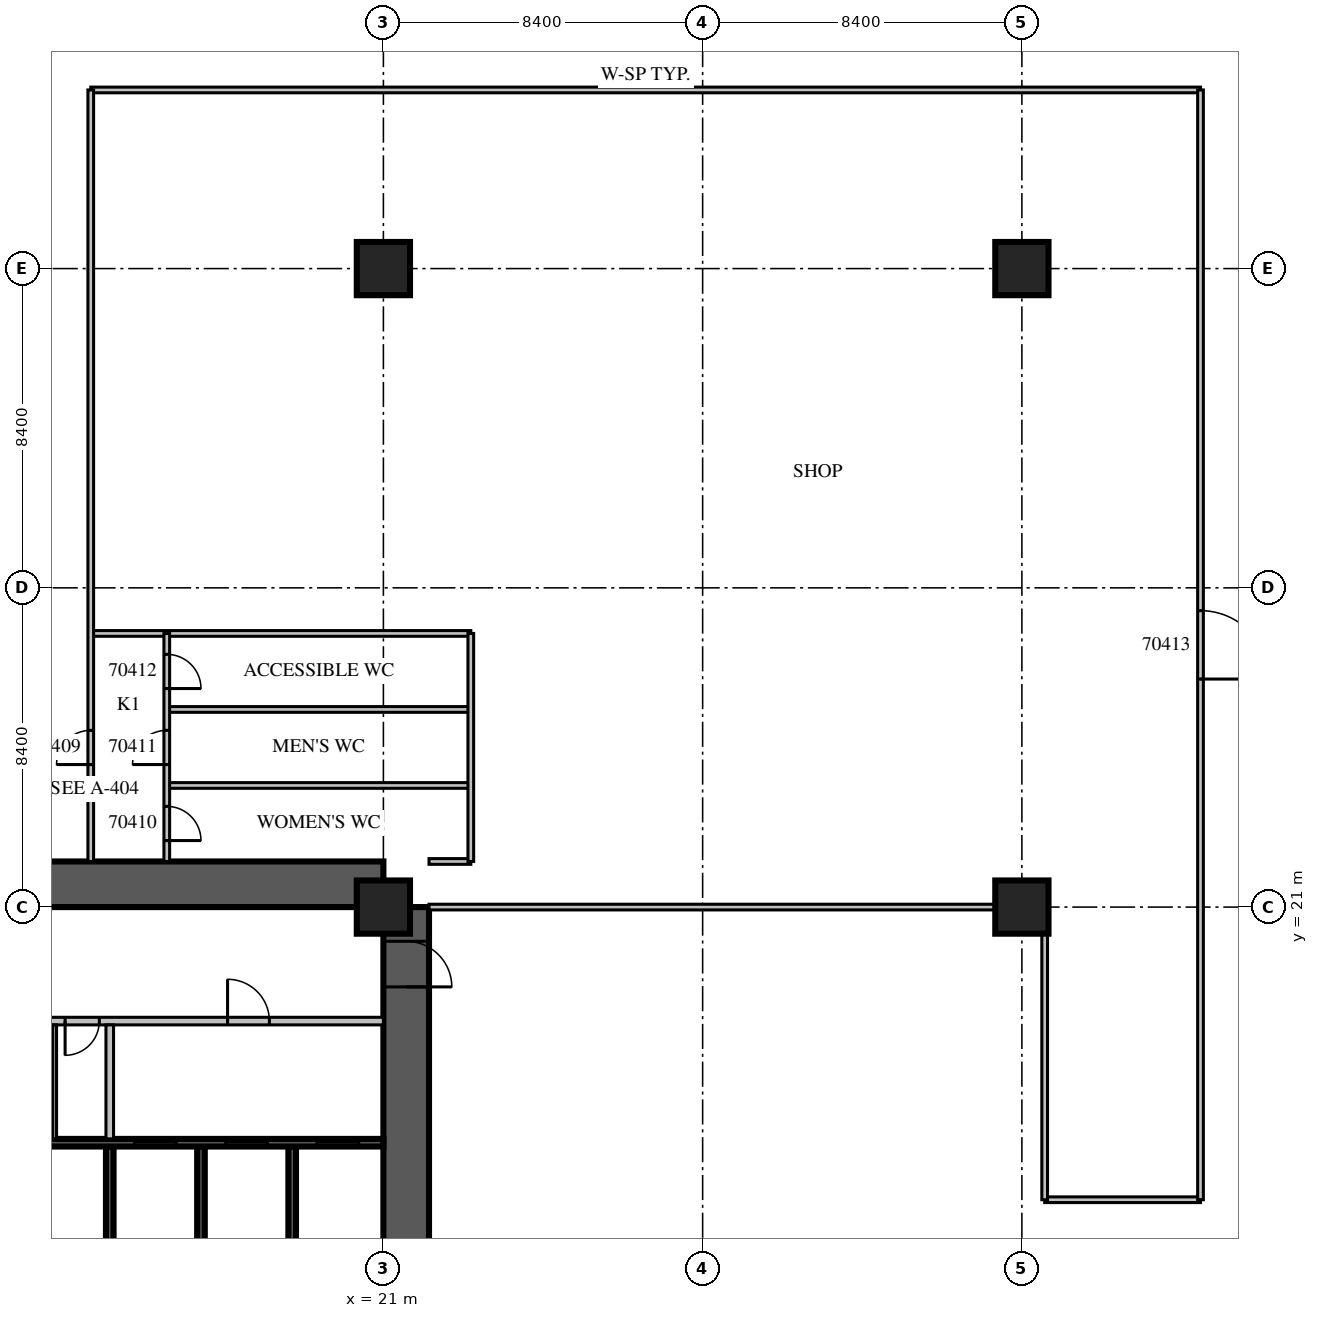
"""IFC4 building model, lengths in metres.
Left out: names, types, materials, properties, quantities, classifications, styles, units other than length and angle.
Written with IfcOpenShell. Run it as: python <this file> out.ifc"""

import sys

from ifc_helpers import new_model, si_unit, direction, frame, frame_2d, origin, origin_2d, place, context, subcontext, project, spatial, rectangle, extrude, source, transform, mapped, element, fill, save


model = new_model("IFC4")
c1 = context("Model", 3, precision=1e-05, world=origin(), true_north=direction((0.0, 1.0)))
c2 = subcontext(c1, "Body", "Model", "MODEL_VIEW")
j1 = project(units=[si_unit("LENGTHUNIT", "METRE"), si_unit("PLANEANGLEUNIT", "RADIAN")], contexts=[c1])
p1 = place(None, origin())
s1 = spatial("IfcSite", under=j1, at=p1, CompositionType="ELEMENT")
p2 = place(p1, origin())
s2 = spatial("IfcBuilding", under=s1, at=p2, CompositionType="ELEMENT")
p3 = place(p2, frame((0.0, 0.0, 7.5)))
s3 = spatial("IfcBuildingStorey", under=s2, at=p3, CompositionType="ELEMENT", Elevation=7.5)
m1 = source(origin(), c2, "Body", "SweptSolid", [
    extrude(rectangle(XDim=1.4, YDim=1.4, at=origin_2d()), origin(), (0.0, 0.0, 1.0), 5.4),
])
for number, where, z_axis, x_axis in (
    (1, (21.0, 21.0, 0.0), (0.0, 0.0, 1.0), (1.0, 0.0, 0.0)),
    (2, (21.0, 37.8, 0.0), (0.0, 0.0, 1.0), (1.0, 0.0, 0.0)),
    (3, (37.8, 21.0, 0.0), (0.0, 0.0, 1.0), (1.0, 0.0, 0.0)),
    (4, (37.8, 37.8, 0.0), (0.0, 0.0, 1.0), (1.0, 0.0, 0.0)),
):
    element("IfcColumn", number, at=place(p3, frame(where, z_axis=z_axis, x_axis=x_axis)), inside=s3, PredefinedType="COLUMN", context=c2, shape_type="MappedRepresentation", body=[
        mapped(m1, transform((0.0, 0.0, 0.0), scale=1.0)),
    ])
p4 = place(p3, frame((21.6, 4.2, 0.0), z_axis=(0.0, 0.0, 1.0), x_axis=(0.0, 1.0, 0.0)))
e5 = element("IfcWall", 5, at=p4, inside=s3, PredefinedType="SHEAR", context=c2, shape_type="SweptSolid", body=[
    extrude(rectangle(XDim=16.8, YDim=1.2, at=frame_2d((8.4, 0.0))), origin(), (0.0, 0.0, 1.0), 5.4),
])
m2 = source(origin(), c2, "Body", "SweptSolid", [
    extrude(rectangle(XDim=2.2, YDim=2.1, at=frame_2d((1.1, 1.05))), frame((0.0, 0.61, 0.0), z_axis=(0.0, -1.0, 0.0), x_axis=(1.0, 0.0, 0.0)), (0.0, 0.0, 1.0), 1.22),
])
p5 = place(p4, frame((4.2, 0.0, 0.0)))
e6 = element("IfcOpeningElement", 6, at=p5, cuts=e5, PredefinedType="OPENING", context=c2, shape_type="MappedRepresentation", body=[
    mapped(m2, transform((0.0, 0.0, 0.0), scale=1.0)),
])
m3 = source(origin(), c2, "Body", "SweptSolid", [
    extrude(rectangle(XDim=1.2, YDim=2.1, at=frame_2d((0.6, 1.05))), frame((0.0, 0.61, 0.0), z_axis=(0.0, -1.0, 0.0), x_axis=(1.0, 0.0, 0.0)), (0.0, 0.0, 1.0), 1.22),
])
p6 = place(p4, frame((14.7, 0.0, 0.0)))
e7 = element("IfcOpeningElement", 7, at=p6, cuts=e5, PredefinedType="OPENING", context=c2, shape_type="MappedRepresentation", body=[
    mapped(m3, transform((0.0, 0.0, 0.0), scale=1.0)),
])
m4 = source(origin(), c2, "Body", "SweptSolid", [
    extrude(rectangle(XDim=16.8, YDim=1.2, at=frame_2d((8.4, 0.0))), origin(), (0.0, 0.0, 1.0), 5.4),
])
p7 = place(p3, frame((4.2, 21.6, 0.0), z_axis=(0.0, 0.0, 1.0), x_axis=(1.0, 0.0, 0.0)))
e8 = element("IfcWall", 8, at=p7, inside=s3, PredefinedType="SHEAR", context=c2, shape_type="MappedRepresentation", body=[
    mapped(m4, transform((0.0, 0.0, 0.0), scale=1.0)),
])
p8 = place(p7, frame((6.2, 0.0, 0.0)))
e9 = element("IfcOpeningElement", 9, at=p8, cuts=e8, PredefinedType="OPENING", context=c2, shape_type="MappedRepresentation", body=[
    mapped(m3, transform((0.0, 0.0, 0.0), scale=1.0)),
])
m5 = source(origin(), c2, "Body", "SweptSolid", [
    extrude(rectangle(XDim=3.0, YDim=0.2, at=frame_2d((1.5, 0.0))), origin(), (0.0, 0.0, 1.0), 5.4),
])
for number, where, z_axis, x_axis in (
    (10, (13.8, 11.7, 0.0), (0.0, 0.0, 1.0), (0.0, 1.0, 0.0)),
    (11, (16.2, 11.7, 0.0), (0.0, 0.0, 1.0), (0.0, 1.0, 0.0)),
    (12, (18.6, 11.7, 0.0), (0.0, 0.0, 1.0), (0.0, 1.0, 0.0)),
):
    element("IfcWall", number, at=place(p3, frame(where, z_axis=z_axis, x_axis=x_axis)), inside=s3, PredefinedType="SOLIDWALL", context=c2, shape_type="MappedRepresentation", body=[
        mapped(m5, transform((0.0, 0.0, 0.0), scale=1.0)),
    ])
m6 = source(origin(), c2, "Body", "SweptSolid", [
    extrude(rectangle(XDim=16.8, YDim=0.2, at=frame_2d((8.4, 0.0))), origin(), (0.0, 0.0, 1.0), 5.4),
])
p9 = place(p3, frame((4.2, 14.8, 0.0), z_axis=(0.0, 0.0, 1.0), x_axis=(1.0, 0.0, 0.0)))
e13 = element("IfcWall", 13, at=p9, inside=s3, PredefinedType="SOLIDWALL", context=c2, shape_type="MappedRepresentation", body=[
    mapped(m6, transform((0.0, 0.0, 0.0), scale=1.0)),
])
m7 = source(origin(), c2, "Body", "SweptSolid", [
    extrude(rectangle(XDim=1.1, YDim=2.1, at=frame_2d((0.55, 1.05))), frame((0.0, 0.11, 0.0), z_axis=(0.0, -1.0, 0.0), x_axis=(1.0, 0.0, 0.0)), (0.0, 0.0, 1.0), 0.22),
])
p10 = place(p9, frame((10.25, 0.0, 0.0)))
e14 = element("IfcOpeningElement", 14, at=p10, cuts=e13, PredefinedType="OPENING", context=c2, shape_type="MappedRepresentation", body=[
    mapped(m7, transform((0.0, 0.0, 0.0), scale=1.0)),
])
p11 = place(p9, frame((12.65, 0.0, 0.0)))
e15 = element("IfcOpeningElement", 15, at=p11, cuts=e13, PredefinedType="OPENING", context=c2, shape_type="MappedRepresentation", body=[
    mapped(m7, transform((0.0, 0.0, 0.0), scale=1.0)),
])
p12 = place(p9, frame((15.05, 0.0, 0.0)))
e16 = element("IfcOpeningElement", 16, at=p12, cuts=e13, PredefinedType="OPENING", context=c2, shape_type="MappedRepresentation", body=[
    mapped(m7, transform((0.0, 0.0, 0.0), scale=1.0)),
])
p13 = place(p3, frame((9.55, 18.0, 0.0), z_axis=(0.0, 0.0, 1.0), x_axis=(1.0, 0.0, 0.0)))
e17 = element("IfcWall", 17, at=p13, inside=s3, PredefinedType="PARTITIONING", context=c2, shape_type="SweptSolid", body=[
    extrude(rectangle(XDim=11.45, YDim=0.2, at=frame_2d((5.725, 0.0))), origin(), (0.0, 0.0, 1.0), 4.8),
])
m8 = source(origin(), c2, "Body", "SweptSolid", [
    extrude(rectangle(XDim=0.9, YDim=2.1, at=frame_2d((0.45, 1.05))), frame((0.0, 0.11, 0.0), z_axis=(0.0, -1.0, 0.0), x_axis=(1.0, 0.0, 0.0)), (0.0, 0.0, 1.0), 0.22),
])
p14 = place(p13, frame((0.375, 0.0, 0.0)))
e18 = element("IfcOpeningElement", 18, at=p14, cuts=e17, PredefinedType="OPENING", context=c2, shape_type="MappedRepresentation", body=[
    mapped(m8, transform((0.0, 0.0, 0.0), scale=1.0)),
])
p15 = place(p13, frame((1.7, 0.0, 0.0)))
e19 = element("IfcOpeningElement", 19, at=p15, cuts=e17, PredefinedType="OPENING", context=c2, shape_type="MappedRepresentation", body=[
    mapped(m8, transform((0.0, 0.0, 0.0), scale=1.0)),
])
p16 = place(p13, frame((3.075, 0.0, 0.0)))
e20 = element("IfcOpeningElement", 20, at=p16, cuts=e17, PredefinedType="OPENING", context=c2, shape_type="MappedRepresentation", body=[
    mapped(m8, transform((0.0, 0.0, 0.0), scale=1.0)),
])
p17 = place(p13, frame((7.35, 0.0, 0.0)))
e21 = element("IfcOpeningElement", 21, at=p17, cuts=e17, PredefinedType="OPENING", context=c2, shape_type="MappedRepresentation", body=[
    mapped(m7, transform((0.0, 0.0, 0.0), scale=1.0)),
])
m9 = source(origin(), c2, "Body", "SweptSolid", [
    extrude(rectangle(XDim=3.0, YDim=0.2, at=frame_2d((1.5, 0.0))), origin(), (0.0, 0.0, 1.0), 4.8),
])
p18 = place(p3, frame((13.8, 14.9, 0.0), z_axis=(0.0, 0.0, 1.0), x_axis=(0.0, 1.0, 0.0)))
e22 = element("IfcWall", 22, at=p18, inside=s3, PredefinedType="PARTITIONING", context=c2, shape_type="MappedRepresentation", body=[
    mapped(m9, transform((0.0, 0.0, 0.0), scale=1.0)),
])
m10 = source(origin(), c2, "Body", "SweptSolid", [
    extrude(rectangle(XDim=3.0, YDim=0.1, at=frame_2d((1.5, 0.0))), origin(), (0.0, 0.0, 1.0), 4.8),
])
p19 = place(p3, frame((12.35, 14.9, 0.0), z_axis=(0.0, 0.0, 1.0), x_axis=(0.0, 1.0, 0.0)))
e23 = element("IfcWall", 23, at=p19, inside=s3, PredefinedType="PARTITIONING", context=c2, shape_type="MappedRepresentation", body=[
    mapped(m10, transform((0.0, 0.0, 0.0), scale=1.0)),
])
p20 = place(p3, frame((38.4, 13.3, 0.0), z_axis=(0.0, 0.0, 1.0), x_axis=(1.0, 0.0, 0.0)))
e24 = element("IfcWall", 24, at=p20, inside=s3, PredefinedType="PARTITIONING", context=c2, shape_type="SweptSolid", body=[
    extrude(rectangle(XDim=4.1, YDim=0.15, at=frame_2d((2.05, 0.0))), origin(), (0.0, 0.0, 1.0), 4.8),
])
p21 = place(p3, frame((22.2, 21.0, 0.0), z_axis=(0.0, 0.0, 1.0), x_axis=(1.0, 0.0, 0.0)))
e25 = element("IfcWall", 25, at=p21, inside=s3, PredefinedType="PARTITIONING", context=c2, shape_type="SweptSolid", body=[
    extrude(rectangle(XDim=16.2, YDim=0.15, at=frame_2d((8.1, 0.0))), origin(), (0.0, 0.0, 1.0), 4.8),
])
p22 = place(p3, frame((22.2, 22.2, 0.0), z_axis=(0.0, 0.0, 1.0), x_axis=(1.0, 0.0, 0.0)))
e26 = element("IfcWall", 26, at=p22, inside=s3, PredefinedType="PARTITIONING", context=c2, shape_type="SweptSolid", body=[
    extrude(rectangle(XDim=1.1, YDim=0.15, at=frame_2d((0.55, 0.0))), origin(), (0.0, 0.0, 1.0), 4.8),
])
p23 = place(p3, frame((15.3, 24.2, 0.0), z_axis=(0.0, 0.0, 1.0), x_axis=(1.0, 0.0, 0.0)))
e27 = element("IfcWall", 27, at=p23, inside=s3, PredefinedType="PARTITIONING", context=c2, shape_type="SweptSolid", body=[
    extrude(rectangle(XDim=8.0, YDim=0.15, at=frame_2d((4.0, 0.0))), origin(), (0.0, 0.0, 1.0), 4.8),
])
m11 = source(origin(), c2, "Body", "SweptSolid", [
    extrude(rectangle(XDim=8.0, YDim=0.15, at=frame_2d((4.0, 0.0))), origin(), (0.0, 0.0, 1.0), 4.8),
])
p24 = place(p3, frame((15.3, 26.2, 0.0), z_axis=(0.0, 0.0, 1.0), x_axis=(1.0, 0.0, 0.0)))
e28 = element("IfcWall", 28, at=p24, inside=s3, PredefinedType="PARTITIONING", context=c2, shape_type="MappedRepresentation", body=[
    mapped(m11, transform((0.0, 0.0, 0.0), scale=1.0)),
])
p25 = place(p3, frame((13.3, 28.2, 0.0), z_axis=(0.0, 0.0, 1.0), x_axis=(1.0, 0.0, 0.0)))
e29 = element("IfcWall", 29, at=p25, inside=s3, PredefinedType="PARTITIONING", context=c2, shape_type="SweptSolid", body=[
    extrude(rectangle(XDim=10.0, YDim=0.15, at=frame_2d((5.0, 0.0))), origin(), (0.0, 0.0, 1.0), 4.8),
])
p26 = place(p3, frame((13.3, 42.5, 0.0), z_axis=(0.0, 0.0, 1.0), x_axis=(1.0, 0.0, 0.0)))
e30 = element("IfcWall", 30, at=p26, inside=s3, PredefinedType="PARTITIONING", context=c2, shape_type="SweptSolid", body=[
    extrude(rectangle(XDim=29.2, YDim=0.15, at=frame_2d((14.6, 0.0))), origin(), (0.0, 0.0, 1.0), 4.8),
])
p27 = place(p3, frame((13.3, 22.2, 0.0), z_axis=(0.0, 0.0, 1.0), x_axis=(0.0, 1.0, 0.0)))
e31 = element("IfcWall", 31, at=p27, inside=s3, PredefinedType="PARTITIONING", context=c2, shape_type="SweptSolid", body=[
    extrude(rectangle(XDim=20.3, YDim=0.15, at=frame_2d((10.15, 0.0))), origin(), (0.0, 0.0, 1.0), 4.8),
])
m12 = source(origin(), c2, "Body", "SweptSolid", [
    extrude(rectangle(XDim=0.9, YDim=2.1, at=frame_2d((0.45, 1.05))), frame((0.0, 0.085, 0.0), z_axis=(0.0, -1.0, 0.0), x_axis=(1.0, 0.0, 0.0)), (0.0, 0.0, 1.0), 0.17),
])
p28 = place(p27, frame((2.55, 0.0, 0.0)))
e32 = element("IfcOpeningElement", 32, at=p28, cuts=e31, PredefinedType="OPENING", context=c2, shape_type="MappedRepresentation", body=[
    mapped(m12, transform((0.0, 0.0, 0.0), scale=1.0)),
])
p29 = place(p3, frame((15.3, 22.2, 0.0), z_axis=(0.0, 0.0, 1.0), x_axis=(0.0, 1.0, 0.0)))
e33 = element("IfcWall", 33, at=p29, inside=s3, PredefinedType="PARTITIONING", context=c2, shape_type="SweptSolid", body=[
    extrude(rectangle(XDim=6.0, YDim=0.15, at=frame_2d((3.0, 0.0))), origin(), (0.0, 0.0, 1.0), 4.8),
])
p30 = place(p29, frame((0.55, 0.0, 0.0)))
e34 = element("IfcOpeningElement", 34, at=p30, cuts=e33, PredefinedType="OPENING", context=c2, shape_type="MappedRepresentation", body=[
    mapped(m12, transform((0.0, 0.0, 0.0), scale=1.0)),
])
p31 = place(p29, frame((2.55, 0.0, 0.0)))
e35 = element("IfcOpeningElement", 35, at=p31, cuts=e33, PredefinedType="OPENING", context=c2, shape_type="MappedRepresentation", body=[
    mapped(m12, transform((0.0, 0.0, 0.0), scale=1.0)),
])
p32 = place(p29, frame((4.55, 0.0, 0.0)))
e36 = element("IfcOpeningElement", 36, at=p32, cuts=e33, PredefinedType="OPENING", context=c2, shape_type="MappedRepresentation", body=[
    mapped(m12, transform((0.0, 0.0, 0.0), scale=1.0)),
])
m13 = source(origin(), c2, "Body", "SweptSolid", [
    extrude(rectangle(XDim=6.0, YDim=0.15, at=frame_2d((3.0, 0.0))), origin(), (0.0, 0.0, 1.0), 4.8),
])
p33 = place(p3, frame((23.3, 22.2, 0.0), z_axis=(0.0, 0.0, 1.0), x_axis=(0.0, 1.0, 0.0)))
e37 = element("IfcWall", 37, at=p33, inside=s3, PredefinedType="PARTITIONING", context=c2, shape_type="MappedRepresentation", body=[
    mapped(m13, transform((0.0, 0.0, 0.0), scale=1.0)),
])
p34 = place(p3, frame((38.4, 13.3, 0.0), z_axis=(0.0, 0.0, 1.0), x_axis=(0.0, 1.0, 0.0)))
e38 = element("IfcWall", 38, at=p34, inside=s3, PredefinedType="PARTITIONING", context=c2, shape_type="SweptSolid", body=[
    extrude(rectangle(XDim=7.7, YDim=0.15, at=frame_2d((3.85, 0.0))), origin(), (0.0, 0.0, 1.0), 4.8),
])
m14 = source(origin(), c2, "Body", "SweptSolid", [
    extrude(rectangle(XDim=29.2, YDim=0.15, at=frame_2d((14.6, 0.0))), origin(), (0.0, 0.0, 1.0), 4.8),
])
p35 = place(p3, frame((42.5, 13.3, 0.0), z_axis=(0.0, 0.0, 1.0), x_axis=(0.0, 1.0, 0.0)))
e39 = element("IfcWall", 39, at=p35, inside=s3, PredefinedType="PARTITIONING", context=c2, shape_type="MappedRepresentation", body=[
    mapped(m14, transform((0.0, 0.0, 0.0), scale=1.0)),
])
m15 = source(origin(), c2, "Body", "SweptSolid", [
    extrude(rectangle(XDim=1.8, YDim=2.1, at=frame_2d((0.9, 1.05))), frame((0.0, 0.085, 0.0), z_axis=(0.0, -1.0, 0.0), x_axis=(1.0, 0.0, 0.0)), (0.0, 0.0, 1.0), 0.17),
])
p36 = place(p35, frame((13.7, 0.0, 0.0)))
e40 = element("IfcOpeningElement", 40, at=p36, cuts=e39, PredefinedType="OPENING", context=c2, shape_type="MappedRepresentation", body=[
    mapped(m15, transform((0.0, 0.0, 0.0), scale=1.0)),
])
m16 = source(origin(), c2, "Body", "SweptSolid", [
    extrude(rectangle(XDim=1.1, YDim=2.1, at=frame_2d((0.55, 1.05))), frame((0.0, 0.025, 0.0), z_axis=(0.0, -1.0, 0.0), x_axis=(1.0, 0.0, 0.0)), (0.0, 0.0, 1.0), 0.05),
])
p37 = place(p10, origin())
e41 = element("IfcDoor", 41, at=p37, inside=s3, OperationType="SLIDING_TO_LEFT", PredefinedType="DOOR", context=c2, shape_type="MappedRepresentation", body=[
    mapped(m16, transform((0.0, 0.0, 0.0), scale=1.0)),
])
fill(e14, e41)
p38 = place(p11, origin())
e42 = element("IfcDoor", 42, at=p38, inside=s3, OperationType="SLIDING_TO_LEFT", PredefinedType="DOOR", context=c2, shape_type="MappedRepresentation", body=[
    mapped(m16, transform((0.0, 0.0, 0.0), scale=1.0)),
])
fill(e15, e42)
p39 = place(p12, origin())
e43 = element("IfcDoor", 43, at=p39, inside=s3, OperationType="SLIDING_TO_LEFT", PredefinedType="DOOR", context=c2, shape_type="MappedRepresentation", body=[
    mapped(m16, transform((0.0, 0.0, 0.0), scale=1.0)),
])
fill(e16, e43)
m17 = source(origin(), c2, "Body", "SweptSolid", [
    extrude(rectangle(XDim=0.9, YDim=2.1, at=frame_2d((0.45, 1.05))), frame((0.0, 0.025, 0.0), z_axis=(0.0, -1.0, 0.0), x_axis=(1.0, 0.0, 0.0)), (0.0, 0.0, 1.0), 0.05),
])
p40 = place(p16, origin())
e44 = element("IfcDoor", 44, at=p40, inside=s3, OperationType="SINGLE_SWING_RIGHT", PredefinedType="DOOR", context=c2, shape_type="MappedRepresentation", body=[
    mapped(m17, transform((0.0, 0.0, 0.0), scale=1.0)),
])
fill(e20, e44)
p41 = place(p17, origin())
e45 = element("IfcDoor", 45, at=p41, inside=s3, OperationType="SINGLE_SWING_LEFT", PredefinedType="DOOR", context=c2, shape_type="MappedRepresentation", body=[
    mapped(m16, transform((0.0, 0.0, 0.0), scale=1.0)),
])
fill(e21, e45)
m18 = source(origin(), c2, "Body", "SweptSolid", [
    extrude(rectangle(XDim=1.2, YDim=2.1, at=frame_2d((0.6, 1.05))), frame((0.0, 0.025, 0.0), z_axis=(0.0, -1.0, 0.0), x_axis=(1.0, 0.0, 0.0)), (0.0, 0.0, 1.0), 0.05),
])
p42 = place(p6, origin())
e46 = element("IfcDoor", 46, at=p42, inside=s3, OperationType="SINGLE_SWING_RIGHT", PredefinedType="DOOR", context=c2, shape_type="MappedRepresentation", body=[
    mapped(m18, transform((0.0, 0.0, 0.0), scale=1.0)),
])
fill(e7, e46)
p43 = place(p28, origin())
e47 = element("IfcDoor", 47, at=p43, inside=s3, OperationType="SINGLE_SWING_LEFT", PredefinedType="DOOR", context=c2, shape_type="MappedRepresentation", body=[
    mapped(m17, transform((0.0, 0.0, 0.0), scale=1.0)),
])
fill(e32, e47)
p44 = place(p30, origin())
e48 = element("IfcDoor", 48, at=p44, inside=s3, OperationType="SINGLE_SWING_RIGHT", PredefinedType="DOOR", context=c2, shape_type="MappedRepresentation", body=[
    mapped(m17, transform((0.0, 0.0, 0.0), scale=1.0)),
])
fill(e34, e48)
p45 = place(p31, origin())
e49 = element("IfcDoor", 49, at=p45, inside=s3, OperationType="SINGLE_SWING_LEFT", PredefinedType="DOOR", context=c2, shape_type="MappedRepresentation", body=[
    mapped(m17, transform((0.0, 0.0, 0.0), scale=1.0)),
])
fill(e35, e49)
p46 = place(p32, origin())
e50 = element("IfcDoor", 50, at=p46, inside=s3, OperationType="SINGLE_SWING_RIGHT", PredefinedType="DOOR", context=c2, shape_type="MappedRepresentation", body=[
    mapped(m17, transform((0.0, 0.0, 0.0), scale=1.0)),
])
fill(e36, e50)
m19 = source(origin(), c2, "Body", "SweptSolid", [
    extrude(rectangle(XDim=1.8, YDim=2.1, at=frame_2d((0.9, 1.05))), frame((0.0, 0.025, 0.0), z_axis=(0.0, -1.0, 0.0), x_axis=(1.0, 0.0, 0.0)), (0.0, 0.0, 1.0), 0.05),
])
p47 = place(p36, origin())
e51 = element("IfcDoor", 51, at=p47, inside=s3, OperationType="DOUBLE_DOOR_SINGLE_SWING", PredefinedType="DOOR", context=c2, shape_type="MappedRepresentation", body=[
    mapped(m19, transform((0.0, 0.0, 0.0), scale=1.0)),
])
fill(e40, e51)
save(model, sys.argv[1])
